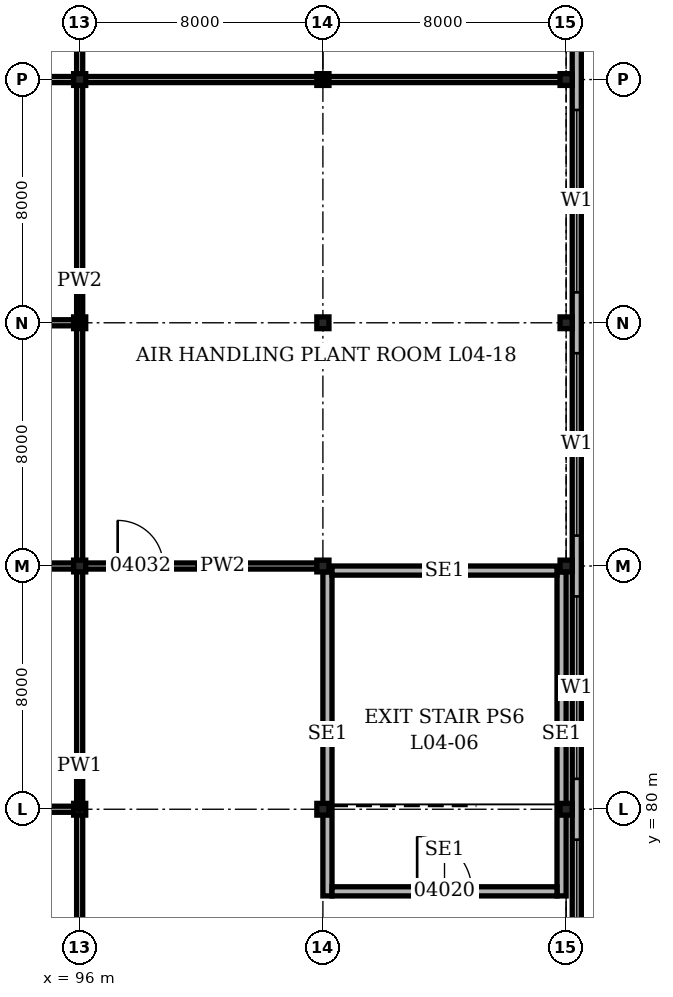
"""IFC4 building model, lengths in metres.
Left out: names, types, materials, properties, quantities, classifications, styles, units other than length and angle.
Written with IfcOpenShell. Run it as: python <this file> out.ifc"""

import sys

from ifc_helpers import new_model, si_unit, direction, frame, frame_2d, origin, origin_2d, place, context, subcontext, project, spatial, rectangle, i_section, extrude, element, fill, save


model = new_model("IFC4")
c1 = context("Model", 3, precision=1e-05, world=origin(), true_north=direction((0.0, 1.0)))
c2 = subcontext(c1, "Body", "Model", "MODEL_VIEW")
j1 = project(units=[si_unit("LENGTHUNIT", "METRE"), si_unit("PLANEANGLEUNIT", "RADIAN")], contexts=[c1])
p1 = place(None, origin())
s1 = spatial("IfcSite", under=j1, at=p1, CompositionType="ELEMENT")
p2 = place(p1, origin())
s2 = spatial("IfcBuilding", under=s1, at=p2, CompositionType="ELEMENT")
p3 = place(p2, frame((0.0, 0.0, 19.9)))
s3 = spatial("IfcBuildingStorey", under=s2, at=p3, CompositionType="ELEMENT", Elevation=19.9)
for number, where, z_axis, x_axis in (
    (1, (96.0, 80.0, 0.0), (0.0, 0.0, 1.0), (1.0, 0.0, 0.0)),
    (2, (96.0, 88.0, 0.0), (0.0, 0.0, 1.0), (1.0, 0.0, 0.0)),
    (3, (96.0, 96.0, 0.0), (0.0, 0.0, 1.0), (1.0, 0.0, 0.0)),
    (4, (96.0, 104.0, 0.0), (0.0, 0.0, 1.0), (1.0, 0.0, 0.0)),
    (5, (104.0, 80.0, 0.0), (0.0, 0.0, 1.0), (1.0, 0.0, 0.0)),
    (6, (104.0, 88.0, 0.0), (0.0, 0.0, 1.0), (1.0, 0.0, 0.0)),
    (7, (104.0, 96.0, 0.0), (0.0, 0.0, 1.0), (1.0, 0.0, 0.0)),
    (8, (104.0, 104.0, 0.0), (0.0, 0.0, 1.0), (1.0, 0.0, 0.0)),
    (9, (112.0, 80.0, 0.0), (0.0, 0.0, 1.0), (1.0, 0.0, 0.0)),
    (10, (112.0, 88.0, 0.0), (0.0, 0.0, 1.0), (1.0, 0.0, 0.0)),
    (11, (112.0, 96.0, 0.0), (0.0, 0.0, 1.0), (1.0, 0.0, 0.0)),
    (12, (112.0, 104.0, 0.0), (0.0, 0.0, 1.0), (1.0, 0.0, 0.0)),
):
    element("IfcColumn", number, at=place(p3, frame(where, z_axis=z_axis, x_axis=x_axis)), inside=s3, PredefinedType="COLUMN", context=c2, shape_type="SweptSolid", body=[
        extrude(i_section(OverallWidth=0.399, OverallDepth=0.386, WebThickness=0.021, FlangeThickness=0.033, at=origin_2d()), origin(), (0.0, 0.0, 1.0), 6.0),
    ])
p4 = place(p3, frame((112.35, -0.35, 0.0), z_axis=(0.0, 0.0, 1.0), x_axis=(0.0, 1.0, 0.0)))
e13 = element("IfcWall", 13, at=p4, inside=s3, PredefinedType="SOLIDWALL", context=c2, shape_type="SweptSolid", body=[
    extrude(rectangle(XDim=112.7, YDim=0.3, at=frame_2d((56.35, 0.0))), origin(), (0.0, 0.0, 1.0), 6.0),
])
p5 = place(p4, frame((1.35, 0.0, 1.0)))
e14 = element("IfcOpeningElement", 14, at=p5, cuts=e13, PredefinedType="OPENING", context=c2, shape_type="SweptSolid", body=[
    extrude(rectangle(XDim=6.0, YDim=1.5, at=frame_2d((3.0, 0.75))), frame((0.0, 0.16, 0.0), z_axis=(0.0, -1.0, 0.0), x_axis=(1.0, 0.0, 0.0)), (0.0, 0.0, 1.0), 0.32),
])
p6 = place(p4, frame((9.35, 0.0, 1.0)))
e15 = element("IfcOpeningElement", 15, at=p6, cuts=e13, PredefinedType="OPENING", context=c2, shape_type="SweptSolid", body=[
    extrude(rectangle(XDim=6.0, YDim=1.5, at=frame_2d((3.0, 0.75))), frame((0.0, 0.16, 0.0), z_axis=(0.0, -1.0, 0.0), x_axis=(1.0, 0.0, 0.0)), (0.0, 0.0, 1.0), 0.32),
])
p7 = place(p4, frame((17.35, 0.0, 1.0)))
e16 = element("IfcOpeningElement", 16, at=p7, cuts=e13, PredefinedType="OPENING", context=c2, shape_type="SweptSolid", body=[
    extrude(rectangle(XDim=6.0, YDim=1.5, at=frame_2d((3.0, 0.75))), frame((0.0, 0.16, 0.0), z_axis=(0.0, -1.0, 0.0), x_axis=(1.0, 0.0, 0.0)), (0.0, 0.0, 1.0), 0.32),
])
p8 = place(p4, frame((25.35, 0.0, 1.0)))
e17 = element("IfcOpeningElement", 17, at=p8, cuts=e13, PredefinedType="OPENING", context=c2, shape_type="SweptSolid", body=[
    extrude(rectangle(XDim=6.0, YDim=1.5, at=frame_2d((3.0, 0.75))), frame((0.0, 0.16, 0.0), z_axis=(0.0, -1.0, 0.0), x_axis=(1.0, 0.0, 0.0)), (0.0, 0.0, 1.0), 0.32),
])
p9 = place(p4, frame((33.35, 0.0, 1.0)))
e18 = element("IfcOpeningElement", 18, at=p9, cuts=e13, PredefinedType="OPENING", context=c2, shape_type="SweptSolid", body=[
    extrude(rectangle(XDim=6.0, YDim=1.5, at=frame_2d((3.0, 0.75))), frame((0.0, 0.16, 0.0), z_axis=(0.0, -1.0, 0.0), x_axis=(1.0, 0.0, 0.0)), (0.0, 0.0, 1.0), 0.32),
])
p10 = place(p4, frame((41.35, 0.0, 1.0)))
e19 = element("IfcOpeningElement", 19, at=p10, cuts=e13, PredefinedType="OPENING", context=c2, shape_type="SweptSolid", body=[
    extrude(rectangle(XDim=6.0, YDim=1.5, at=frame_2d((3.0, 0.75))), frame((0.0, 0.16, 0.0), z_axis=(0.0, -1.0, 0.0), x_axis=(1.0, 0.0, 0.0)), (0.0, 0.0, 1.0), 0.32),
])
p11 = place(p4, frame((49.35, 0.0, 1.0)))
e20 = element("IfcOpeningElement", 20, at=p11, cuts=e13, PredefinedType="OPENING", context=c2, shape_type="SweptSolid", body=[
    extrude(rectangle(XDim=6.0, YDim=1.5, at=frame_2d((3.0, 0.75))), frame((0.0, 0.16, 0.0), z_axis=(0.0, -1.0, 0.0), x_axis=(1.0, 0.0, 0.0)), (0.0, 0.0, 1.0), 0.32),
])
p12 = place(p4, frame((57.35, 0.0, 1.0)))
e21 = element("IfcOpeningElement", 21, at=p12, cuts=e13, PredefinedType="OPENING", context=c2, shape_type="SweptSolid", body=[
    extrude(rectangle(XDim=6.0, YDim=1.5, at=frame_2d((3.0, 0.75))), frame((0.0, 0.16, 0.0), z_axis=(0.0, -1.0, 0.0), x_axis=(1.0, 0.0, 0.0)), (0.0, 0.0, 1.0), 0.32),
])
p13 = place(p4, frame((65.35, 0.0, 1.0)))
e22 = element("IfcOpeningElement", 22, at=p13, cuts=e13, PredefinedType="OPENING", context=c2, shape_type="SweptSolid", body=[
    extrude(rectangle(XDim=6.0, YDim=1.5, at=frame_2d((3.0, 0.75))), frame((0.0, 0.16, 0.0), z_axis=(0.0, -1.0, 0.0), x_axis=(1.0, 0.0, 0.0)), (0.0, 0.0, 1.0), 0.32),
])
p14 = place(p4, frame((73.35, 0.0, 1.0)))
e23 = element("IfcOpeningElement", 23, at=p14, cuts=e13, PredefinedType="OPENING", context=c2, shape_type="SweptSolid", body=[
    extrude(rectangle(XDim=6.0, YDim=1.5, at=frame_2d((3.0, 0.75))), frame((0.0, 0.16, 0.0), z_axis=(0.0, -1.0, 0.0), x_axis=(1.0, 0.0, 0.0)), (0.0, 0.0, 1.0), 0.32),
])
p15 = place(p4, frame((81.35, 0.0, 1.0)))
e24 = element("IfcOpeningElement", 24, at=p15, cuts=e13, PredefinedType="OPENING", context=c2, shape_type="SweptSolid", body=[
    extrude(rectangle(XDim=6.0, YDim=1.5, at=frame_2d((3.0, 0.75))), frame((0.0, 0.16, 0.0), z_axis=(0.0, -1.0, 0.0), x_axis=(1.0, 0.0, 0.0)), (0.0, 0.0, 1.0), 0.32),
])
p16 = place(p4, frame((89.35, 0.0, 1.0)))
e25 = element("IfcOpeningElement", 25, at=p16, cuts=e13, PredefinedType="OPENING", context=c2, shape_type="SweptSolid", body=[
    extrude(rectangle(XDim=6.0, YDim=1.5, at=frame_2d((3.0, 0.75))), frame((0.0, 0.16, 0.0), z_axis=(0.0, -1.0, 0.0), x_axis=(1.0, 0.0, 0.0)), (0.0, 0.0, 1.0), 0.32),
])
p17 = place(p4, frame((97.35, 0.0, 1.0)))
e26 = element("IfcOpeningElement", 26, at=p17, cuts=e13, PredefinedType="OPENING", context=c2, shape_type="SweptSolid", body=[
    extrude(rectangle(XDim=6.0, YDim=1.5, at=frame_2d((3.0, 0.75))), frame((0.0, 0.16, 0.0), z_axis=(0.0, -1.0, 0.0), x_axis=(1.0, 0.0, 0.0)), (0.0, 0.0, 1.0), 0.32),
])
p18 = place(p4, frame((105.35, 0.0, 1.0)))
e27 = element("IfcOpeningElement", 27, at=p18, cuts=e13, PredefinedType="OPENING", context=c2, shape_type="SweptSolid", body=[
    extrude(rectangle(XDim=6.0, YDim=1.5, at=frame_2d((3.0, 0.75))), frame((0.0, 0.16, 0.0), z_axis=(0.0, -1.0, 0.0), x_axis=(1.0, 0.0, 0.0)), (0.0, 0.0, 1.0), 0.32),
])
for number, where, z_axis, x_axis in (
    (28, (104.15, 77.15, 0.0), (0.0, 0.0, 1.0), (0.0, 1.0, 0.0)),
    (29, (111.85, 77.15, 0.0), (0.0, 0.0, 1.0), (0.0, 1.0, 0.0)),
):
    element("IfcWall", number, at=place(p3, frame(where, z_axis=z_axis, x_axis=x_axis)), inside=s3, PredefinedType="SOLIDWALL", context=c2, shape_type="SweptSolid", body=[
        extrude(rectangle(XDim=10.657, YDim=0.3, at=frame_2d((5.329, 0.0))), origin(), (0.0, 0.0, 1.0), 5.75),
    ])
p19 = place(p3, frame((104.3, 77.3, 0.0), z_axis=(0.0, 0.0, 1.0), x_axis=(1.0, 0.0, 0.0)))
e30 = element("IfcWall", 30, at=p19, inside=s3, PredefinedType="SOLIDWALL", context=c2, shape_type="SweptSolid", body=[
    extrude(rectangle(XDim=7.4, YDim=0.3, at=frame_2d((3.7, 0.0))), origin(), (0.0, 0.0, 1.0), 5.75),
])
p20 = place(p19, frame((2.8, 0.0, 0.0)))
e31 = element("IfcOpeningElement", 31, at=p20, cuts=e30, PredefinedType="OPENING", context=c2, shape_type="SweptSolid", body=[
    extrude(rectangle(XDim=1.8, YDim=2.1, at=frame_2d((0.9, 1.05))), frame((0.0, 0.16, 0.0), z_axis=(0.0, -1.0, 0.0), x_axis=(1.0, 0.0, 0.0)), (0.0, 0.0, 1.0), 0.32),
])
p21 = place(p3, frame((104.3, 87.85, 0.0), z_axis=(0.0, 0.0, 1.0), x_axis=(1.0, 0.0, 0.0)))
e32 = element("IfcWall", 32, at=p21, inside=s3, PredefinedType="SOLIDWALL", context=c2, shape_type="SweptSolid", body=[
    extrude(rectangle(XDim=7.4, YDim=0.3, at=frame_2d((3.7, 0.0))), origin(), (0.0, 0.0, 1.0), 5.75),
])
p22 = place(p3, frame((72.1, 80.0, 0.0), z_axis=(0.0, 0.0, 1.0), x_axis=(1.0, 0.0, 0.0)))
e33 = element("IfcWall", 33, at=p22, inside=s3, PredefinedType="PARTITIONING", context=c2, shape_type="SweptSolid", body=[
    extrude(rectangle(XDim=23.8, YDim=0.2, at=frame_2d((11.9, 0.0))), origin(), (0.0, 0.0, 1.0), 4.978),
])
p23 = place(p3, frame((72.1, 88.0, 0.0), z_axis=(0.0, 0.0, 1.0), x_axis=(1.0, 0.0, 0.0)))
e34 = element("IfcWall", 34, at=p23, inside=s3, PredefinedType="PARTITIONING", context=c2, shape_type="SweptSolid", body=[
    extrude(rectangle(XDim=23.9, YDim=0.2, at=frame_2d((11.95, 0.0))), origin(), (0.0, 0.0, 1.0), 4.978),
])
p24 = place(p3, frame((96.0, 88.0, 0.0), z_axis=(0.0, 0.0, 1.0), x_axis=(1.0, 0.0, 0.0)))
e35 = element("IfcWall", 35, at=p24, inside=s3, PredefinedType="PARTITIONING", context=c2, shape_type="SweptSolid", body=[
    extrude(rectangle(XDim=7.9, YDim=0.2, at=frame_2d((3.95, 0.0))), origin(), (0.0, 0.0, 1.0), 4.978),
])
p25 = place(p24, frame((1.25, 0.0, 0.0)))
e36 = element("IfcOpeningElement", 36, at=p25, cuts=e35, PredefinedType="OPENING", context=c2, shape_type="SweptSolid", body=[
    extrude(rectangle(XDim=1.5, YDim=2.4, at=frame_2d((0.75, 1.2))), frame((0.0, 0.11, 0.0), z_axis=(0.0, -1.0, 0.0), x_axis=(1.0, 0.0, 0.0)), (0.0, 0.0, 1.0), 0.22),
])
p26 = place(p3, frame((72.1, 96.0, 0.0), z_axis=(0.0, 0.0, 1.0), x_axis=(1.0, 0.0, 0.0)))
e37 = element("IfcWall", 37, at=p26, inside=s3, PredefinedType="PARTITIONING", context=c2, shape_type="SweptSolid", body=[
    extrude(rectangle(XDim=23.8, YDim=0.2, at=frame_2d((11.9, 0.0))), origin(), (0.0, 0.0, 1.0), 4.978),
])
p27 = place(p3, frame((24.1, 104.0, 0.0), z_axis=(0.0, 0.0, 1.0), x_axis=(1.0, 0.0, 0.0)))
e38 = element("IfcWall", 38, at=p27, inside=s3, PredefinedType="PARTITIONING", context=c2, shape_type="SweptSolid", body=[
    extrude(rectangle(XDim=71.9, YDim=0.2, at=frame_2d((35.95, 0.0))), origin(), (0.0, 0.0, 1.0), 4.978),
])
p28 = place(p27, frame((1.0, 0.0, 0.0)))
e39 = element("IfcOpeningElement", 39, at=p28, cuts=e38, PredefinedType="OPENING", context=c2, shape_type="SweptSolid", body=[
    extrude(rectangle(XDim=1.8, YDim=2.4, at=frame_2d((0.9, 1.2))), frame((0.0, 0.11, 0.0), z_axis=(0.0, -1.0, 0.0), x_axis=(1.0, 0.0, 0.0)), (0.0, 0.0, 1.0), 0.22),
])
p29 = place(p27, frame((26.0, 0.0, 0.0)))
e40 = element("IfcOpeningElement", 40, at=p29, cuts=e38, PredefinedType="OPENING", context=c2, shape_type="SweptSolid", body=[
    extrude(rectangle(XDim=1.8, YDim=2.4, at=frame_2d((0.9, 1.2))), frame((0.0, 0.11, 0.0), z_axis=(0.0, -1.0, 0.0), x_axis=(1.0, 0.0, 0.0)), (0.0, 0.0, 1.0), 0.22),
])
p30 = place(p27, frame((34.0, 0.0, 0.0)))
e41 = element("IfcOpeningElement", 41, at=p30, cuts=e38, PredefinedType="OPENING", context=c2, shape_type="SweptSolid", body=[
    extrude(rectangle(XDim=1.8, YDim=2.4, at=frame_2d((0.9, 1.2))), frame((0.0, 0.11, 0.0), z_axis=(0.0, -1.0, 0.0), x_axis=(1.0, 0.0, 0.0)), (0.0, 0.0, 1.0), 0.22),
])
p31 = place(p27, frame((44.65, 0.0, 0.0)))
e42 = element("IfcOpeningElement", 42, at=p31, cuts=e38, PredefinedType="OPENING", context=c2, shape_type="SweptSolid", body=[
    extrude(rectangle(XDim=1.0, YDim=2.1, at=frame_2d((0.5, 1.05))), frame((0.0, 0.11, 0.0), z_axis=(0.0, -1.0, 0.0), x_axis=(1.0, 0.0, 0.0)), (0.0, 0.0, 1.0), 0.22),
])
p32 = place(p3, frame((96.0, 104.0, 0.0), z_axis=(0.0, 0.0, 1.0), x_axis=(1.0, 0.0, 0.0)))
e43 = element("IfcWall", 43, at=p32, inside=s3, PredefinedType="PARTITIONING", context=c2, shape_type="SweptSolid", body=[
    extrude(rectangle(XDim=16.0, YDim=0.2, at=frame_2d((8.0, 0.0))), origin(), (0.0, 0.0, 1.0), 4.978),
])
p33 = place(p3, frame((96.0, 72.1, 0.0), z_axis=(0.0, 0.0, 1.0), x_axis=(0.0, 1.0, 0.0)))
e44 = element("IfcWall", 44, at=p33, inside=s3, PredefinedType="PARTITIONING", context=c2, shape_type="SweptSolid", body=[
    extrude(rectangle(XDim=15.9, YDim=0.2, at=frame_2d((7.95, 0.0))), origin(), (0.0, 0.0, 1.0), 4.978),
])
p34 = place(p3, frame((96.0, 88.0, 0.0), z_axis=(0.0, 0.0, 1.0), x_axis=(0.0, 1.0, 0.0)))
e45 = element("IfcWall", 45, at=p34, inside=s3, PredefinedType="PARTITIONING", context=c2, shape_type="SweptSolid", body=[
    extrude(rectangle(XDim=16.0, YDim=0.2, at=frame_2d((8.0, 0.0))), origin(), (0.0, 0.0, 1.0), 4.978),
])
p35 = place(p3, frame((96.0, 104.0, 0.0), z_axis=(0.0, 0.0, 1.0), x_axis=(0.0, 1.0, 0.0)))
e46 = element("IfcWall", 46, at=p35, inside=s3, PredefinedType="PARTITIONING", context=c2, shape_type="SweptSolid", body=[
    extrude(rectangle(XDim=8.15, YDim=0.2, at=frame_2d((4.075, 0.0))), origin(), (0.0, 0.0, 1.0), 4.978),
])
p36 = place(p35, frame((1.5, 0.0, 0.0)))
e47 = element("IfcOpeningElement", 47, at=p36, cuts=e46, PredefinedType="OPENING", context=c2, shape_type="SweptSolid", body=[
    extrude(rectangle(XDim=1.0, YDim=2.1, at=frame_2d((0.5, 1.05))), frame((0.0, 0.11, 0.0), z_axis=(0.0, -1.0, 0.0), x_axis=(1.0, 0.0, 0.0)), (0.0, 0.0, 1.0), 0.22),
])
p37 = place(p14, origin())
e48 = element("IfcWindow", 48, at=p37, inside=s3, PartitioningType="SINGLE_PANEL", PredefinedType="WINDOW", context=c2, shape_type="SweptSolid", body=[
    extrude(rectangle(XDim=6.0, YDim=1.5, at=frame_2d((3.0, 0.75))), frame((0.0, 0.03, 0.0), z_axis=(0.0, -1.0, 0.0), x_axis=(1.0, 0.0, 0.0)), (0.0, 0.0, 1.0), 0.06),
])
fill(e23, e48)
p38 = place(p15, origin())
e49 = element("IfcWindow", 49, at=p38, inside=s3, PartitioningType="SINGLE_PANEL", PredefinedType="WINDOW", context=c2, shape_type="SweptSolid", body=[
    extrude(rectangle(XDim=6.0, YDim=1.5, at=frame_2d((3.0, 0.75))), frame((0.0, 0.03, 0.0), z_axis=(0.0, -1.0, 0.0), x_axis=(1.0, 0.0, 0.0)), (0.0, 0.0, 1.0), 0.06),
])
fill(e24, e49)
p39 = place(p16, origin())
e50 = element("IfcWindow", 50, at=p39, inside=s3, PartitioningType="SINGLE_PANEL", PredefinedType="WINDOW", context=c2, shape_type="SweptSolid", body=[
    extrude(rectangle(XDim=6.0, YDim=1.5, at=frame_2d((3.0, 0.75))), frame((0.0, 0.03, 0.0), z_axis=(0.0, -1.0, 0.0), x_axis=(1.0, 0.0, 0.0)), (0.0, 0.0, 1.0), 0.06),
])
fill(e25, e50)
p40 = place(p17, origin())
e51 = element("IfcWindow", 51, at=p40, inside=s3, PartitioningType="SINGLE_PANEL", PredefinedType="WINDOW", context=c2, shape_type="SweptSolid", body=[
    extrude(rectangle(XDim=6.0, YDim=1.5, at=frame_2d((3.0, 0.75))), frame((0.0, 0.03, 0.0), z_axis=(0.0, -1.0, 0.0), x_axis=(1.0, 0.0, 0.0)), (0.0, 0.0, 1.0), 0.06),
])
fill(e26, e51)
p41 = place(p20, origin())
e52 = element("IfcDoor", 52, at=p41, inside=s3, OperationType="DOUBLE_DOOR_SINGLE_SWING", PredefinedType="DOOR", context=c2, shape_type="SweptSolid", body=[
    extrude(rectangle(XDim=1.8, YDim=2.1, at=frame_2d((0.9, 1.05))), frame((0.0, 0.15, 0.0), z_axis=(0.0, -1.0, 0.0), x_axis=(1.0, 0.0, 0.0)), (0.0, 0.0, 1.0), 0.3),
])
fill(e31, e52)
p42 = place(p25, origin())
e53 = element("IfcDoor", 53, at=p42, inside=s3, OperationType="DOUBLE_DOOR_SINGLE_SWING", PredefinedType="DOOR", context=c2, shape_type="SweptSolid", body=[
    extrude(rectangle(XDim=1.5, YDim=2.4, at=frame_2d((0.75, 1.2))), frame((0.0, 0.1, 0.0), z_axis=(0.0, -1.0, 0.0), x_axis=(1.0, 0.0, 0.0)), (0.0, 0.0, 1.0), 0.199),
])
fill(e36, e53)
save(model, sys.argv[1])
